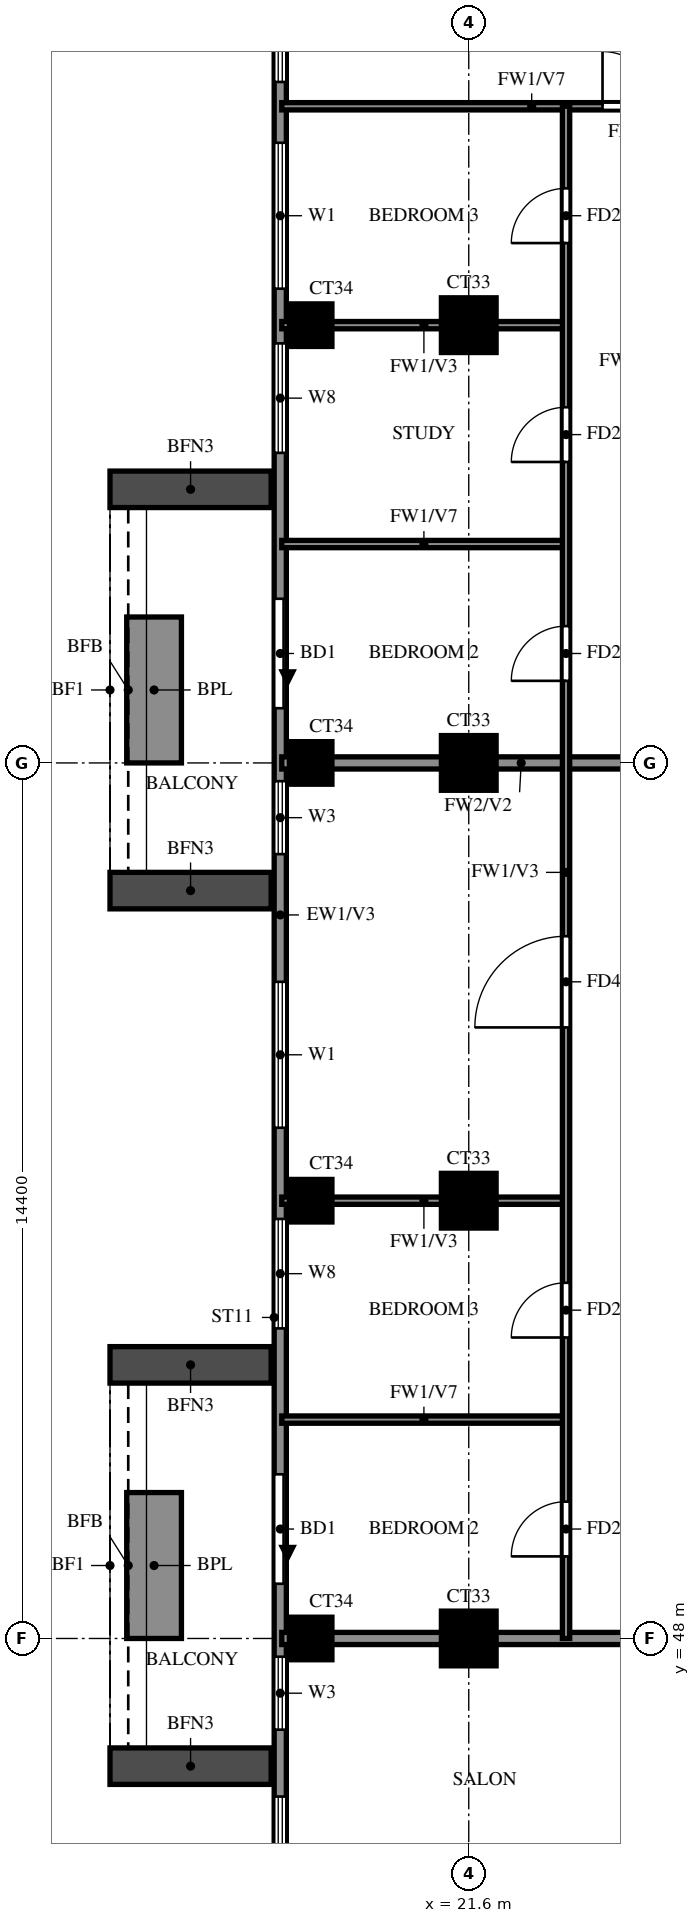
"""IFC4 building model, lengths in metres.
Left out: names, types, materials, properties, quantities, classifications, styles, units other than length and angle.
Written with IfcOpenShell. Run it as: python <this file> out.ifc"""

import sys

from ifc_helpers import new_model, si_unit, direction, frame, frame_2d, origin, origin_2d, place, context, subcontext, project, spatial, rectangle, extrude, source, transform, mapped, element, fill, save


model = new_model("IFC4")
c1 = context("Model", 3, precision=1e-05, world=origin(), true_north=direction((0.0, 1.0)))
c2 = subcontext(c1, "Body", "Model", "MODEL_VIEW")
j1 = project(units=[si_unit("LENGTHUNIT", "METRE"), si_unit("PLANEANGLEUNIT", "RADIAN")], contexts=[c1])
p1 = place(None, origin())
s1 = spatial("IfcSite", under=j1, at=p1, CompositionType="ELEMENT")
p2 = place(p1, origin())
s2 = spatial("IfcBuilding", under=s1, at=p2, CompositionType="ELEMENT")
p3 = place(p2, frame((0.0, 0.0, 229.0)))
s3 = spatial("IfcBuildingStorey", under=s2, at=p3, CompositionType="ELEMENT", Elevation=229.0)
m1 = source(origin(), c2, "Body", "SweptSolid", [
    extrude(rectangle(XDim=0.7, YDim=0.7, at=origin_2d()), origin(), (0.0, 0.0, 1.0), 3.22),
])
p4 = place(p3, frame((19.0, 48.0, 0.0), z_axis=(0.0, 0.0, 1.0), x_axis=(1.0, 0.0, 0.0)))
e1 = element("IfcColumn", 1, at=p4, inside=s3, PredefinedType="COLUMN", context=c2, shape_type="MappedRepresentation", body=[
    mapped(m1, transform((0.0, 0.0, 0.0))),
])
m2 = source(origin(), c2, "Body", "SweptSolid", [
    extrude(rectangle(XDim=0.9, YDim=0.9, at=origin_2d()), origin(), (0.0, 0.0, 1.0), 3.22),
])
p5 = place(p3, frame((21.6, 48.0, 0.0), z_axis=(0.0, 0.0, 1.0), x_axis=(1.0, 0.0, 0.0)))
e2 = element("IfcColumn", 2, at=p5, inside=s3, PredefinedType="COLUMN", context=c2, shape_type="MappedRepresentation", body=[
    mapped(m2, transform((0.0, 0.0, 0.0))),
])
p6 = place(p3, frame((19.0, 55.2, 0.0), z_axis=(0.0, 0.0, 1.0), x_axis=(1.0, 0.0, 0.0)))
e3 = element("IfcColumn", 3, at=p6, inside=s3, PredefinedType="COLUMN", context=c2, shape_type="MappedRepresentation", body=[
    mapped(m1, transform((0.0, 0.0, 0.0))),
])
p7 = place(p3, frame((21.6, 55.2, 0.0), z_axis=(0.0, 0.0, 1.0), x_axis=(1.0, 0.0, 0.0)))
e4 = element("IfcColumn", 4, at=p7, inside=s3, PredefinedType="COLUMN", context=c2, shape_type="MappedRepresentation", body=[
    mapped(m2, transform((0.0, 0.0, 0.0))),
])
p8 = place(p3, frame((19.0, 62.4, 0.0), z_axis=(0.0, 0.0, 1.0), x_axis=(1.0, 0.0, 0.0)))
e5 = element("IfcColumn", 5, at=p8, inside=s3, PredefinedType="COLUMN", context=c2, shape_type="MappedRepresentation", body=[
    mapped(m1, transform((0.0, 0.0, 0.0))),
])
p9 = place(p3, frame((21.6, 62.4, 0.0), z_axis=(0.0, 0.0, 1.0), x_axis=(1.0, 0.0, 0.0)))
e6 = element("IfcColumn", 6, at=p9, inside=s3, PredefinedType="COLUMN", context=c2, shape_type="MappedRepresentation", body=[
    mapped(m2, transform((0.0, 0.0, 0.0))),
])
p10 = place(p3, frame((19.0, 69.6, 0.0), z_axis=(0.0, 0.0, 1.0), x_axis=(1.0, 0.0, 0.0)))
e7 = element("IfcColumn", 7, at=p10, inside=s3, PredefinedType="COLUMN", context=c2, shape_type="MappedRepresentation", body=[
    mapped(m1, transform((0.0, 0.0, 0.0))),
])
p11 = place(p3, frame((21.6, 69.6, 0.0), z_axis=(0.0, 0.0, 1.0), x_axis=(1.0, 0.0, 0.0)))
e8 = element("IfcColumn", 8, at=p11, inside=s3, PredefinedType="COLUMN", context=c2, shape_type="MappedRepresentation", body=[
    mapped(m2, transform((0.0, 0.0, 0.0))),
])
p12 = place(p3, frame((18.5, 76.6, 0.0), z_axis=(0.0, 0.0, 1.0), x_axis=(0.0, -1.0, 0.0)))
e9 = element("IfcWall", 9, at=p12, inside=s3, PredefinedType="SOLIDWALL", context=c2, shape_type="SweptSolid", body=[
    extrude(rectangle(XDim=33.4, YDim=0.2, at=frame_2d((16.7, 0.0))), origin(), (0.0, 0.0, 1.0), 3.22),
])
p13 = place(p12, frame((11.5, 0.0, 0.0)))
e10 = element("IfcOpeningElement", 10, at=p13, cuts=e9, PredefinedType="OPENING", context=c2, shape_type="SweptSolid", body=[
    extrude(rectangle(XDim=1.8, YDim=2.4, at=frame_2d((0.9, 1.2))), frame((0.0, 0.11, 0.0), z_axis=(0.0, -1.0, 0.0), x_axis=(1.0, 0.0, 0.0)), (0.0, 0.0, 1.0), 0.22),
])
p14 = place(p12, frame((25.9, 0.0, 0.0)))
e11 = element("IfcOpeningElement", 11, at=p14, cuts=e9, PredefinedType="OPENING", context=c2, shape_type="SweptSolid", body=[
    extrude(rectangle(XDim=1.8, YDim=2.4, at=frame_2d((0.9, 1.2))), frame((0.0, 0.11, 0.0), z_axis=(0.0, -1.0, 0.0), x_axis=(1.0, 0.0, 0.0)), (0.0, 0.0, 1.0), 0.22),
])
p15 = place(p12, frame((28.9, 0.0, 0.6)))
e12 = element("IfcOpeningElement", 12, at=p15, cuts=e9, PredefinedType="OPENING", context=c2, shape_type="SweptSolid", body=[
    extrude(rectangle(XDim=1.2, YDim=2.4, at=frame_2d((0.6, 1.2))), frame((0.0, 0.11, 0.0), z_axis=(0.0, -1.0, 0.0), x_axis=(1.0, 0.0, 0.0)), (0.0, 0.0, 1.0), 0.22),
])
p16 = place(p12, frame((31.2, 0.0, 0.6)))
e13 = element("IfcOpeningElement", 13, at=p16, cuts=e9, PredefinedType="OPENING", context=c2, shape_type="SweptSolid", body=[
    extrude(rectangle(XDim=1.8, YDim=2.4, at=frame_2d((0.9, 1.2))), frame((0.0, 0.11, 0.0), z_axis=(0.0, -1.0, 0.0), x_axis=(1.0, 0.0, 0.0)), (0.0, 0.0, 1.0), 0.22),
])
p17 = place(p12, frame((21.7, 0.0, 0.6)))
e14 = element("IfcOpeningElement", 14, at=p17, cuts=e9, PredefinedType="OPENING", context=c2, shape_type="SweptSolid", body=[
    extrude(rectangle(XDim=1.8, YDim=2.4, at=frame_2d((0.9, 1.2))), frame((0.0, 0.11, 0.0), z_axis=(0.0, -1.0, 0.0), x_axis=(1.0, 0.0, 0.0)), (0.0, 0.0, 1.0), 0.22),
])
p18 = place(p12, frame((14.5, 0.0, 0.6)))
e15 = element("IfcOpeningElement", 15, at=p18, cuts=e9, PredefinedType="OPENING", context=c2, shape_type="SweptSolid", body=[
    extrude(rectangle(XDim=1.2, YDim=2.4, at=frame_2d((0.6, 1.2))), frame((0.0, 0.11, 0.0), z_axis=(0.0, -1.0, 0.0), x_axis=(1.0, 0.0, 0.0)), (0.0, 0.0, 1.0), 0.22),
])
p19 = place(p12, frame((17.8, 0.0, 0.6)))
e16 = element("IfcOpeningElement", 16, at=p19, cuts=e9, PredefinedType="OPENING", context=c2, shape_type="SweptSolid", body=[
    extrude(rectangle(XDim=2.4, YDim=2.4, at=frame_2d((1.2, 1.2))), frame((0.0, 0.11, 0.0), z_axis=(0.0, -1.0, 0.0), x_axis=(1.0, 0.0, 0.0)), (0.0, 0.0, 1.0), 0.22),
])
p20 = place(p12, frame((7.3, 0.0, 0.6)))
e17 = element("IfcOpeningElement", 17, at=p20, cuts=e9, PredefinedType="OPENING", context=c2, shape_type="SweptSolid", body=[
    extrude(rectangle(XDim=1.8, YDim=2.4, at=frame_2d((0.9, 1.2))), frame((0.0, 0.11, 0.0), z_axis=(0.0, -1.0, 0.0), x_axis=(1.0, 0.0, 0.0)), (0.0, 0.0, 1.0), 0.22),
])
p21 = place(p12, frame((4.0, 0.0, 0.6)))
e18 = element("IfcOpeningElement", 18, at=p21, cuts=e9, PredefinedType="OPENING", context=c2, shape_type="SweptSolid", body=[
    extrude(rectangle(XDim=2.4, YDim=2.4, at=frame_2d((1.2, 1.2))), frame((0.0, 0.11, 0.0), z_axis=(0.0, -1.0, 0.0), x_axis=(1.0, 0.0, 0.0)), (0.0, 0.0, 1.0), 0.22),
])
p22 = place(p12, frame((0.6, 0.0, 0.6)))
e19 = element("IfcOpeningElement", 19, at=p22, cuts=e9, PredefinedType="OPENING", context=c2, shape_type="SweptSolid", body=[
    extrude(rectangle(XDim=2.4, YDim=2.4, at=frame_2d((1.2, 1.2))), frame((0.0, 0.11, 0.0), z_axis=(0.0, -1.0, 0.0), x_axis=(1.0, 0.0, 0.0)), (0.0, 0.0, 1.0), 0.22),
])
for number, where, z_axis, x_axis in (
    (20, (18.35, 66.9, 0.0), (0.0, 0.0, 1.0), (-1.0, 0.0, 0.0)),
    (21, (18.35, 60.3, 0.0), (0.0, 0.0, 1.0), (-1.0, 0.0, 0.0)),
):
    element("IfcWall", number, at=place(p3, frame(where, z_axis=z_axis, x_axis=x_axis)), inside=s3, PredefinedType="SOLIDWALL", context=c2, shape_type="SweptSolid", body=[
        extrude(rectangle(XDim=2.65, YDim=0.6, at=frame_2d((1.325, 0.0))), origin(), (0.0, 0.0, 1.0), 2.85),
    ])
p23 = place(p3, frame((16.425, 64.8, 0.0), z_axis=(0.0, 0.0, 1.0), x_axis=(0.0, -1.0, 0.0)))
e22 = element("IfcWall", 22, at=p23, inside=s3, PredefinedType="SOLIDWALL", context=c2, shape_type="SweptSolid", body=[
    extrude(rectangle(XDim=2.4, YDim=0.9, at=frame_2d((1.2, 0.0))), origin(), (0.0, 0.0, 1.0), 0.9),
])
for number, where, z_axis, x_axis in (
    (23, (18.35, 52.5, 0.0), (0.0, 0.0, 1.0), (-1.0, 0.0, 0.0)),
    (24, (18.35, 45.9, 0.0), (0.0, 0.0, 1.0), (-1.0, 0.0, 0.0)),
):
    element("IfcWall", number, at=place(p3, frame(where, z_axis=z_axis, x_axis=x_axis)), inside=s3, PredefinedType="SOLIDWALL", context=c2, shape_type="SweptSolid", body=[
        extrude(rectangle(XDim=2.65, YDim=0.6, at=frame_2d((1.325, 0.0))), origin(), (0.0, 0.0, 1.0), 2.85),
    ])
p24 = place(p3, frame((16.425, 50.4, 0.0), z_axis=(0.0, 0.0, 1.0), x_axis=(0.0, -1.0, 0.0)))
e25 = element("IfcWall", 25, at=p24, inside=s3, PredefinedType="SOLIDWALL", context=c2, shape_type="SweptSolid", body=[
    extrude(rectangle(XDim=2.4, YDim=0.9, at=frame_2d((1.2, 0.0))), origin(), (0.0, 0.0, 1.0), 0.9),
])
p25 = place(p3, frame((18.525, 48.0, 0.0), z_axis=(0.0, 0.0, 1.0), x_axis=(1.0, 0.0, 0.0)))
e26 = element("IfcWall", 26, at=p25, inside=s3, PredefinedType="SOLIDWALL", context=c2, shape_type="SweptSolid", body=[
    extrude(rectangle(XDim=15.075, YDim=0.2, at=frame_2d((7.538, 0.0))), origin(), (0.0, 0.0, 1.0), 3.22),
])
p26 = place(p3, frame((18.525, 62.4, 0.0), z_axis=(0.0, 0.0, 1.0), x_axis=(1.0, 0.0, 0.0)))
e27 = element("IfcWall", 27, at=p26, inside=s3, PredefinedType="SOLIDWALL", context=c2, shape_type="SweptSolid", body=[
    extrude(rectangle(XDim=7.875, YDim=0.2, at=frame_2d((3.938, 0.0))), origin(), (0.0, 0.0, 1.0), 3.22),
])
p27 = place(p3, frame((18.525, 51.6, 0.0), z_axis=(0.0, 0.0, 1.0), x_axis=(1.0, 0.0, 0.0)))
e28 = element("IfcWall", 28, at=p27, inside=s3, PredefinedType="PARTITIONING", context=c2, shape_type="SweptSolid", body=[
    extrude(rectangle(XDim=4.675, YDim=0.12, at=frame_2d((2.337, 0.0))), origin(), (0.0, 0.0, 1.0), 2.32),
])
p28 = place(p3, frame((18.525, 55.2, 0.0), z_axis=(0.0, 0.0, 1.0), x_axis=(1.0, 0.0, 0.0)))
e29 = element("IfcWall", 29, at=p28, inside=s3, PredefinedType="PARTITIONING", context=c2, shape_type="SweptSolid", body=[
    extrude(rectangle(XDim=4.675, YDim=0.12, at=frame_2d((2.337, 0.0))), origin(), (0.0, 0.0, 1.0), 3.22),
])
p29 = place(p3, frame((18.525, 66.0, 0.0), z_axis=(0.0, 0.0, 1.0), x_axis=(1.0, 0.0, 0.0)))
e30 = element("IfcWall", 30, at=p29, inside=s3, PredefinedType="PARTITIONING", context=c2, shape_type="SweptSolid", body=[
    extrude(rectangle(XDim=4.675, YDim=0.12, at=frame_2d((2.337, 0.0))), origin(), (0.0, 0.0, 1.0), 2.32),
])
p30 = place(p3, frame((18.525, 69.6, 0.0), z_axis=(0.0, 0.0, 1.0), x_axis=(1.0, 0.0, 0.0)))
e31 = element("IfcWall", 31, at=p30, inside=s3, PredefinedType="PARTITIONING", context=c2, shape_type="SweptSolid", body=[
    extrude(rectangle(XDim=4.675, YDim=0.12, at=frame_2d((2.337, 0.0))), origin(), (0.0, 0.0, 1.0), 3.22),
])
p31 = place(p3, frame((18.525, 73.2, 0.0), z_axis=(0.0, 0.0, 1.0), x_axis=(1.0, 0.0, 0.0)))
e32 = element("IfcWall", 32, at=p31, inside=s3, PredefinedType="PARTITIONING", context=c2, shape_type="SweptSolid", body=[
    extrude(rectangle(XDim=10.275, YDim=0.12, at=frame_2d((5.138, 0.0))), origin(), (0.0, 0.0, 1.0), 2.32),
])
p32 = place(p31, frame((5.275, 0.0, 0.0)))
e33 = element("IfcOpeningElement", 33, at=p32, cuts=e32, PredefinedType="OPENING", context=c2, shape_type="SweptSolid", body=[
    extrude(rectangle(XDim=0.9, YDim=2.1, at=frame_2d((0.45, 1.05))), frame((0.0, 0.07, 0.0), z_axis=(0.0, -1.0, 0.0), x_axis=(1.0, 0.0, 0.0)), (0.0, 0.0, 1.0), 0.14),
])
p33 = place(p3, frame((23.2, 48.0, 0.0), z_axis=(0.0, 0.0, 1.0), x_axis=(0.0, 1.0, 0.0)))
e34 = element("IfcWall", 34, at=p33, inside=s3, PredefinedType="PARTITIONING", context=c2, shape_type="SweptSolid", body=[
    extrude(rectangle(XDim=25.2, YDim=0.12, at=frame_2d((12.6, 0.0))), origin(), (0.0, 0.0, 1.0), 3.22),
])
p34 = place(p33, frame((1.35, 0.0, 0.0)))
e35 = element("IfcOpeningElement", 35, at=p34, cuts=e34, PredefinedType="OPENING", context=c2, shape_type="SweptSolid", body=[
    extrude(rectangle(XDim=0.9, YDim=2.1, at=frame_2d((0.45, 1.05))), frame((0.0, 0.07, 0.0), z_axis=(0.0, -1.0, 0.0), x_axis=(1.0, 0.0, 0.0)), (0.0, 0.0, 1.0), 0.14),
])
p35 = place(p33, frame((4.95, 0.0, 0.0)))
e36 = element("IfcOpeningElement", 36, at=p35, cuts=e34, PredefinedType="OPENING", context=c2, shape_type="SweptSolid", body=[
    extrude(rectangle(XDim=0.9, YDim=2.1, at=frame_2d((0.45, 1.05))), frame((0.0, 0.07, 0.0), z_axis=(0.0, -1.0, 0.0), x_axis=(1.0, 0.0, 0.0)), (0.0, 0.0, 1.0), 0.14),
])
p36 = place(p33, frame((10.05, 0.0, 0.0)))
e37 = element("IfcOpeningElement", 37, at=p36, cuts=e34, PredefinedType="OPENING", context=c2, shape_type="SweptSolid", body=[
    extrude(rectangle(XDim=1.5, YDim=2.1, at=frame_2d((0.75, 1.05))), frame((0.0, 0.07, 0.0), z_axis=(0.0, -1.0, 0.0), x_axis=(1.0, 0.0, 0.0)), (0.0, 0.0, 1.0), 0.14),
])
p37 = place(p33, frame((15.75, 0.0, 0.0)))
e38 = element("IfcOpeningElement", 38, at=p37, cuts=e34, PredefinedType="OPENING", context=c2, shape_type="SweptSolid", body=[
    extrude(rectangle(XDim=0.9, YDim=2.1, at=frame_2d((0.45, 1.05))), frame((0.0, 0.07, 0.0), z_axis=(0.0, -1.0, 0.0), x_axis=(1.0, 0.0, 0.0)), (0.0, 0.0, 1.0), 0.14),
])
p38 = place(p33, frame((19.35, 0.0, 0.0)))
e39 = element("IfcOpeningElement", 39, at=p38, cuts=e34, PredefinedType="OPENING", context=c2, shape_type="SweptSolid", body=[
    extrude(rectangle(XDim=0.9, YDim=2.1, at=frame_2d((0.45, 1.05))), frame((0.0, 0.07, 0.0), z_axis=(0.0, -1.0, 0.0), x_axis=(1.0, 0.0, 0.0)), (0.0, 0.0, 1.0), 0.14),
])
p39 = place(p33, frame((22.95, 0.0, 0.0)))
e40 = element("IfcOpeningElement", 40, at=p39, cuts=e34, PredefinedType="OPENING", context=c2, shape_type="SweptSolid", body=[
    extrude(rectangle(XDim=0.9, YDim=2.1, at=frame_2d((0.45, 1.05))), frame((0.0, 0.07, 0.0), z_axis=(0.0, -1.0, 0.0), x_axis=(1.0, 0.0, 0.0)), (0.0, 0.0, 1.0), 0.14),
])
p40 = place(p13, origin())
e41 = element("IfcDoor", 41, at=p40, inside=s3, OperationType="DOUBLE_DOOR_SLIDING", PredefinedType="DOOR", context=c2, shape_type="SweptSolid", body=[
    extrude(rectangle(XDim=1.8, YDim=2.4, at=frame_2d((0.9, 1.2))), frame((0.0, 0.025, 0.0), z_axis=(0.0, -1.0, 0.0), x_axis=(1.0, 0.0, 0.0)), (0.0, 0.0, 1.0), 0.05),
])
fill(e10, e41)
p41 = place(p14, origin())
e42 = element("IfcDoor", 42, at=p41, inside=s3, OperationType="DOUBLE_DOOR_SLIDING", PredefinedType="DOOR", context=c2, shape_type="SweptSolid", body=[
    extrude(rectangle(XDim=1.8, YDim=2.4, at=frame_2d((0.9, 1.2))), frame((0.0, 0.025, 0.0), z_axis=(0.0, -1.0, 0.0), x_axis=(1.0, 0.0, 0.0)), (0.0, 0.0, 1.0), 0.05),
])
fill(e11, e42)
p42 = place(p15, origin())
e43 = element("IfcWindow", 43, at=p42, inside=s3, PartitioningType="SINGLE_PANEL", PredefinedType="WINDOW", context=c2, shape_type="SweptSolid", body=[
    extrude(rectangle(XDim=1.2, YDim=2.4, at=frame_2d((0.6, 1.2))), frame((0.0, 0.03, 0.0), z_axis=(0.0, -1.0, 0.0), x_axis=(1.0, 0.0, 0.0)), (0.0, 0.0, 1.0), 0.06),
])
fill(e12, e43)
p43 = place(p16, origin())
e44 = element("IfcWindow", 44, at=p43, inside=s3, PartitioningType="DOUBLE_PANEL_VERTICAL", PredefinedType="WINDOW", context=c2, shape_type="SweptSolid", body=[
    extrude(rectangle(XDim=1.8, YDim=2.4, at=frame_2d((0.9, 1.2))), frame((0.0, 0.03, 0.0), z_axis=(0.0, -1.0, 0.0), x_axis=(1.0, 0.0, 0.0)), (0.0, 0.0, 1.0), 0.06),
])
fill(e13, e44)
p44 = place(p17, origin())
e45 = element("IfcWindow", 45, at=p44, inside=s3, PartitioningType="DOUBLE_PANEL_VERTICAL", PredefinedType="WINDOW", context=c2, shape_type="SweptSolid", body=[
    extrude(rectangle(XDim=1.8, YDim=2.4, at=frame_2d((0.9, 1.2))), frame((0.0, 0.03, 0.0), z_axis=(0.0, -1.0, 0.0), x_axis=(1.0, 0.0, 0.0)), (0.0, 0.0, 1.0), 0.06),
])
fill(e14, e45)
p45 = place(p18, origin())
e46 = element("IfcWindow", 46, at=p45, inside=s3, PartitioningType="SINGLE_PANEL", PredefinedType="WINDOW", context=c2, shape_type="SweptSolid", body=[
    extrude(rectangle(XDim=1.2, YDim=2.4, at=frame_2d((0.6, 1.2))), frame((0.0, 0.03, 0.0), z_axis=(0.0, -1.0, 0.0), x_axis=(1.0, 0.0, 0.0)), (0.0, 0.0, 1.0), 0.06),
])
fill(e15, e46)
p46 = place(p19, origin())
e47 = element("IfcWindow", 47, at=p46, inside=s3, PartitioningType="DOUBLE_PANEL_VERTICAL", PredefinedType="WINDOW", context=c2, shape_type="SweptSolid", body=[
    extrude(rectangle(XDim=2.4, YDim=2.4, at=frame_2d((1.2, 1.2))), frame((0.0, 0.03, 0.0), z_axis=(0.0, -1.0, 0.0), x_axis=(1.0, 0.0, 0.0)), (0.0, 0.0, 1.0), 0.06),
])
fill(e16, e47)
p47 = place(p20, origin())
e48 = element("IfcWindow", 48, at=p47, inside=s3, PartitioningType="DOUBLE_PANEL_VERTICAL", PredefinedType="WINDOW", context=c2, shape_type="SweptSolid", body=[
    extrude(rectangle(XDim=1.8, YDim=2.4, at=frame_2d((0.9, 1.2))), frame((0.0, 0.03, 0.0), z_axis=(0.0, -1.0, 0.0), x_axis=(1.0, 0.0, 0.0)), (0.0, 0.0, 1.0), 0.06),
])
fill(e17, e48)
p48 = place(p21, origin())
e49 = element("IfcWindow", 49, at=p48, inside=s3, PartitioningType="DOUBLE_PANEL_VERTICAL", PredefinedType="WINDOW", context=c2, shape_type="SweptSolid", body=[
    extrude(rectangle(XDim=2.4, YDim=2.4, at=frame_2d((1.2, 1.2))), frame((0.0, 0.03, 0.0), z_axis=(0.0, -1.0, 0.0), x_axis=(1.0, 0.0, 0.0)), (0.0, 0.0, 1.0), 0.06),
])
fill(e18, e49)
p49 = place(p22, origin())
e50 = element("IfcWindow", 50, at=p49, inside=s3, PartitioningType="DOUBLE_PANEL_VERTICAL", PredefinedType="WINDOW", context=c2, shape_type="SweptSolid", body=[
    extrude(rectangle(XDim=2.4, YDim=2.4, at=frame_2d((1.2, 1.2))), frame((0.0, 0.03, 0.0), z_axis=(0.0, -1.0, 0.0), x_axis=(1.0, 0.0, 0.0)), (0.0, 0.0, 1.0), 0.06),
])
fill(e19, e50)
p50 = place(p34, origin())
e51 = element("IfcDoor", 51, at=p50, inside=s3, OperationType="SINGLE_SWING_RIGHT", PredefinedType="DOOR", context=c2, shape_type="SweptSolid", body=[
    extrude(rectangle(XDim=0.9, YDim=2.1, at=frame_2d((0.45, 1.05))), frame((0.0, 0.025, 0.0), z_axis=(0.0, -1.0, 0.0), x_axis=(1.0, 0.0, 0.0)), (0.0, 0.0, 1.0), 0.05),
])
fill(e35, e51)
p51 = place(p35, origin())
e52 = element("IfcDoor", 52, at=p51, inside=s3, OperationType="SINGLE_SWING_LEFT", PredefinedType="DOOR", context=c2, shape_type="SweptSolid", body=[
    extrude(rectangle(XDim=0.9, YDim=2.1, at=frame_2d((0.45, 1.05))), frame((0.0, 0.025, 0.0), z_axis=(0.0, -1.0, 0.0), x_axis=(1.0, 0.0, 0.0)), (0.0, 0.0, 1.0), 0.05),
])
fill(e36, e52)
p52 = place(p36, origin())
e53 = element("IfcDoor", 53, at=p52, inside=s3, OperationType="SINGLE_SWING_LEFT", PredefinedType="DOOR", context=c2, shape_type="SweptSolid", body=[
    extrude(rectangle(XDim=1.5, YDim=2.1, at=frame_2d((0.75, 1.05))), frame((0.0, 0.025, 0.0), z_axis=(0.0, -1.0, 0.0), x_axis=(1.0, 0.0, 0.0)), (0.0, 0.0, 1.0), 0.05),
])
fill(e37, e53)
p53 = place(p37, origin())
e54 = element("IfcDoor", 54, at=p53, inside=s3, OperationType="SINGLE_SWING_LEFT", PredefinedType="DOOR", context=c2, shape_type="SweptSolid", body=[
    extrude(rectangle(XDim=0.9, YDim=2.1, at=frame_2d((0.45, 1.05))), frame((0.0, 0.025, 0.0), z_axis=(0.0, -1.0, 0.0), x_axis=(1.0, 0.0, 0.0)), (0.0, 0.0, 1.0), 0.05),
])
fill(e38, e54)
p54 = place(p38, origin())
e55 = element("IfcDoor", 55, at=p54, inside=s3, OperationType="SINGLE_SWING_RIGHT", PredefinedType="DOOR", context=c2, shape_type="SweptSolid", body=[
    extrude(rectangle(XDim=0.9, YDim=2.1, at=frame_2d((0.45, 1.05))), frame((0.0, 0.025, 0.0), z_axis=(0.0, -1.0, 0.0), x_axis=(1.0, 0.0, 0.0)), (0.0, 0.0, 1.0), 0.05),
])
fill(e39, e55)
p55 = place(p39, origin())
e56 = element("IfcDoor", 56, at=p55, inside=s3, OperationType="SINGLE_SWING_LEFT", PredefinedType="DOOR", context=c2, shape_type="SweptSolid", body=[
    extrude(rectangle(XDim=0.9, YDim=2.1, at=frame_2d((0.45, 1.05))), frame((0.0, 0.025, 0.0), z_axis=(0.0, -1.0, 0.0), x_axis=(1.0, 0.0, 0.0)), (0.0, 0.0, 1.0), 0.05),
])
fill(e40, e56)
p56 = place(p32, origin())
e57 = element("IfcDoor", 57, at=p56, inside=s3, OperationType="SINGLE_SWING_LEFT", PredefinedType="DOOR", context=c2, shape_type="SweptSolid", body=[
    extrude(rectangle(XDim=0.9, YDim=2.1, at=frame_2d((0.45, 1.05))), frame((0.0, 0.025, 0.0), z_axis=(0.0, -1.0, 0.0), x_axis=(1.0, 0.0, 0.0)), (0.0, 0.0, 1.0), 0.05),
])
fill(e33, e57)
save(model, sys.argv[1])
